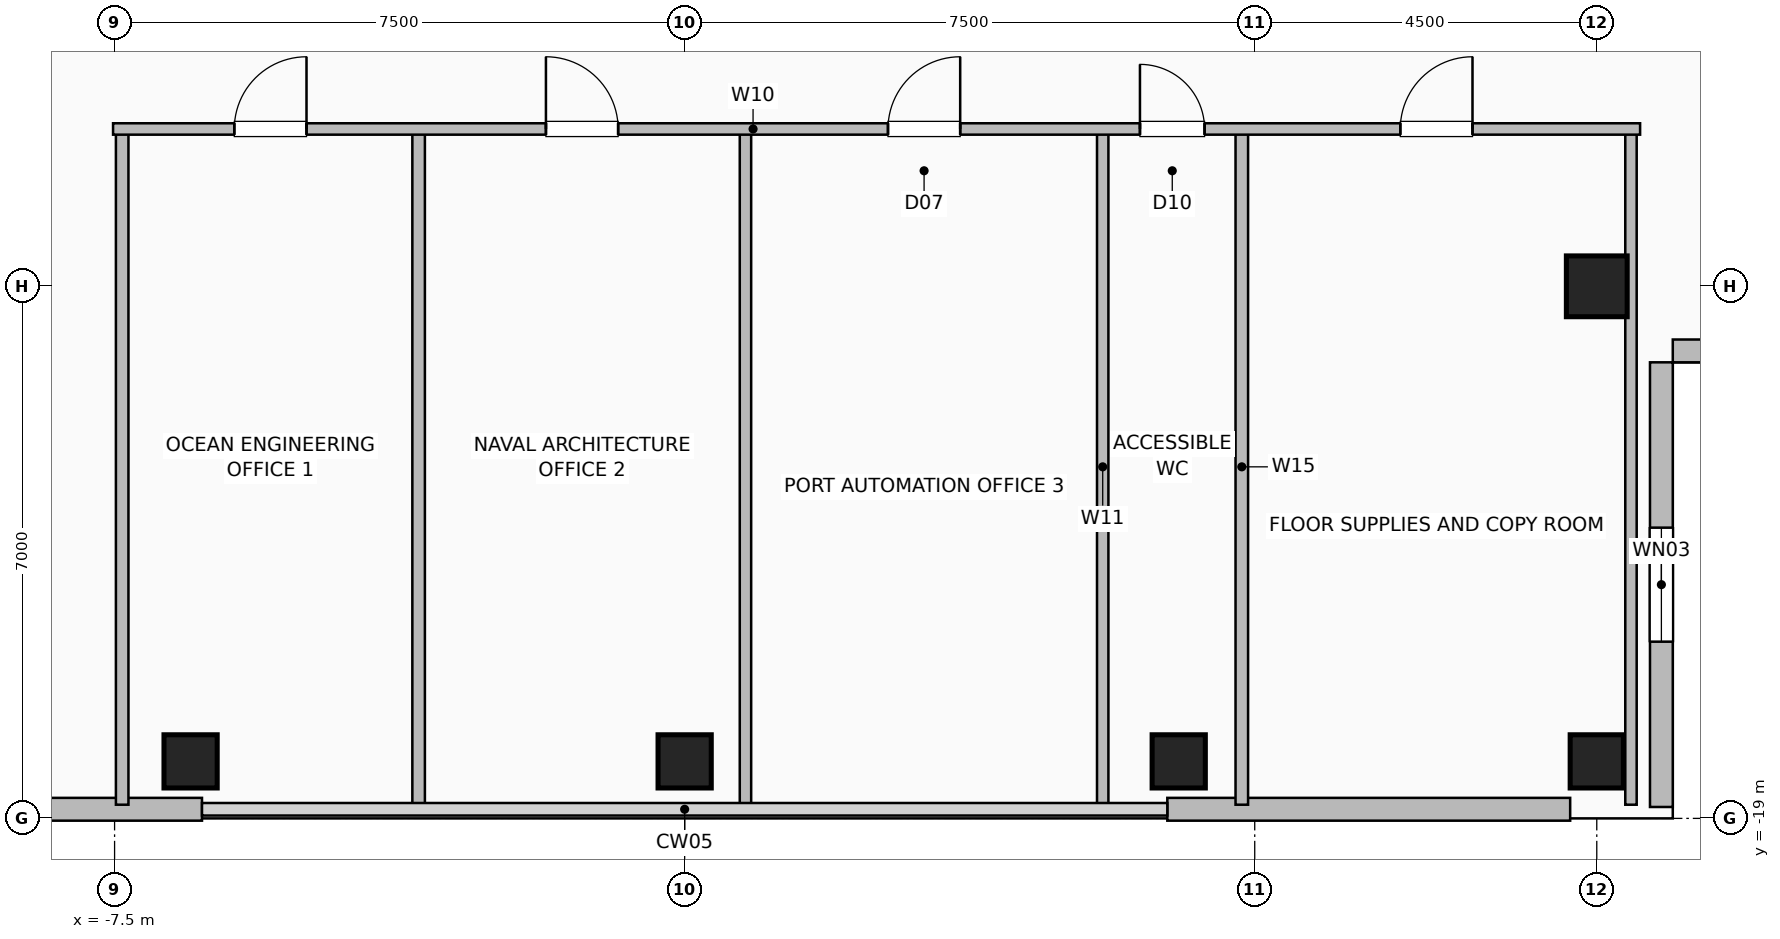
"""IFC4 building model, lengths in metres.
Left out: names, types, materials, properties, quantities, classifications, styles, units other than length and angle.
Written with IfcOpenShell. Run it as: python <this file> out.ifc"""

import sys

from ifc_helpers import new_model, si_unit, direction, frame, frame_2d, origin, origin_2d, place, context, subcontext, project, spatial, rectangle, hollow_rectangle, extrude, element, fill, save


model = new_model("IFC4")
c1 = context("Model", 3, precision=1e-05, world=origin(), true_north=direction((0.0, 1.0)))
c2 = subcontext(c1, "Body", "Model", "MODEL_VIEW")
j1 = project(units=[si_unit("LENGTHUNIT", "METRE"), si_unit("PLANEANGLEUNIT", "RADIAN")], contexts=[c1])
p1 = place(None, origin())
s1 = spatial("IfcSite", under=j1, at=p1, CompositionType="ELEMENT")
p2 = place(p1, origin())
s2 = spatial("IfcBuilding", under=s1, at=p2, CompositionType="ELEMENT")
p3 = place(p2, frame((0.0, 0.0, 290.0)))
s3 = spatial("IfcBuildingStorey", under=s2, at=p3, CompositionType="ELEMENT", Elevation=290.0)
for number, where, z_axis, x_axis in (
    (1, (-6.5, -18.25, 0.0), (0.0, 0.0, 1.0), (1.0, 0.0, 0.0)),
    (2, (0.0, -18.25, 0.0), (0.0, 0.0, 1.0), (1.0, 0.0, 0.0)),
    (3, (6.5, -18.25, 0.0), (0.0, 0.0, 1.0), (1.0, 0.0, 0.0)),
    (4, (12.0, -18.25, 0.0), (0.0, 0.0, 1.0), (1.0, 0.0, 0.0)),
):
    element("IfcColumn", number, at=place(p3, frame(where, z_axis=z_axis, x_axis=x_axis)), inside=s3, PredefinedType="COLUMN", context=c2, shape_type="SweptSolid", body=[
        extrude(hollow_rectangle(XDim=0.7, YDim=0.7, WallThickness=0.035, at=origin_2d()), origin(), (0.0, 0.0, 1.0), 3.6),
    ])
p4 = place(p3, frame((12.0, -12.0, 0.0), z_axis=(0.0, 0.0, 1.0), x_axis=(1.0, 0.0, 0.0)))
e5 = element("IfcColumn", 5, at=p4, inside=s3, PredefinedType="COLUMN", context=c2, shape_type="SweptSolid", body=[
    extrude(hollow_rectangle(XDim=0.8, YDim=0.8, WallThickness=0.04, at=origin_2d()), origin(), (0.0, 0.0, 1.0), 3.6),
])
for number, where, z_axis, x_axis in (
    (6, (-11.65, -18.88, 0.0), (0.0, 0.0, 1.0), (1.0, 0.0, 0.0)),
    (7, (6.35, -18.88, 0.0), (0.0, 0.0, 1.0), (1.0, 0.0, 0.0)),
):
    element("IfcWall", number, at=place(p3, frame(where, z_axis=z_axis, x_axis=x_axis)), inside=s3, PredefinedType="SOLIDWALL", context=c2, shape_type="SweptSolid", body=[
        extrude(rectangle(XDim=5.3, YDim=0.3, at=frame_2d((2.65, 0.0))), origin(), (0.0, 0.0, 1.0), 3.36),
    ])
p5 = place(p3, frame((12.85, -18.85, 0.0), z_axis=(0.0, 0.0, 1.0), x_axis=(0.0, 1.0, 0.0)))
e8 = element("IfcWall", 8, at=p5, inside=s3, PredefinedType="SOLIDWALL", context=c2, shape_type="SweptSolid", body=[
    extrude(rectangle(XDim=5.85, YDim=0.3, at=frame_2d((2.925, 0.0))), origin(), (0.0, 0.0, 1.0), 3.36),
])
p6 = place(p5, frame((2.175, 0.0, 0.9)))
e9 = element("IfcOpeningElement", 9, at=p6, cuts=e8, PredefinedType="OPENING", context=c2, shape_type="SweptSolid", body=[
    extrude(rectangle(XDim=1.5, YDim=1.8, at=frame_2d((0.75, 0.9))), frame((0.0, 0.16, 0.0), z_axis=(0.0, -1.0, 0.0), x_axis=(1.0, 0.0, 0.0)), (0.0, 0.0, 1.0), 0.32),
])
p7 = place(p3, frame((18.85, -12.85, 0.0), z_axis=(0.0, 0.0, 1.0), x_axis=(-1.0, 0.0, 0.0)))
e10 = element("IfcWall", 10, at=p7, inside=s3, PredefinedType="SOLIDWALL", context=c2, shape_type="SweptSolid", body=[
    extrude(rectangle(XDim=5.85, YDim=0.3, at=frame_2d((2.925, 0.0))), origin(), (0.0, 0.0, 1.0), 3.36),
])
for number, where, z_axis, x_axis in (
    (11, (7.33, -18.82, 0.0), (0.0, 0.0, 1.0), (0.0, 1.0, 0.0)),
    (12, (-7.4, -18.82, 0.0), (0.0, 0.0, 1.0), (0.0, 1.0, 0.0)),
    (13, (-3.5, -18.82, 0.0), (0.0, 0.0, 1.0), (0.0, 1.0, 0.0)),
):
    element("IfcWall", number, at=place(p3, frame(where, z_axis=z_axis, x_axis=x_axis)), inside=s3, PredefinedType="PLUMBINGWALL", context=c2, shape_type="SweptSolid", body=[
        extrude(rectangle(XDim=8.89, YDim=0.165, at=frame_2d((4.445, 0.0))), origin(), (0.0, 0.0, 1.0), 3.36),
    ])
for number, where, z_axis, x_axis in (
    (14, (0.8, -18.82, 0.0), (0.0, 0.0, 1.0), (0.0, 1.0, 0.0)),
    (15, (5.5, -18.82, 0.0), (0.0, 0.0, 1.0), (0.0, 1.0, 0.0)),
    (16, (12.45, -18.82, 0.0), (0.0, 0.0, 1.0), (0.0, 1.0, 0.0)),
):
    element("IfcWall", number, at=place(p3, frame(where, z_axis=z_axis, x_axis=x_axis)), inside=s3, PredefinedType="PARTITIONING", context=c2, shape_type="SweptSolid", body=[
        extrude(rectangle(XDim=8.89, YDim=0.15, at=frame_2d((4.445, 0.0))), origin(), (0.0, 0.0, 1.0), 3.36),
    ])
p8 = place(p3, frame((-7.52, -9.93, 0.0), z_axis=(0.0, 0.0, 1.0), x_axis=(1.0, 0.0, 0.0)))
e17 = element("IfcWall", 17, at=p8, inside=s3, PredefinedType="PARTITIONING", context=c2, shape_type="SweptSolid", body=[
    extrude(rectangle(XDim=20.09, YDim=0.15, at=frame_2d((10.045, 0.0))), origin(), (0.0, 0.0, 1.0), 3.36),
])
p9 = place(p8, frame((1.595, 0.0, 0.0)))
e18 = element("IfcOpeningElement", 18, at=p9, cuts=e17, PredefinedType="OPENING", context=c2, shape_type="SweptSolid", body=[
    extrude(rectangle(XDim=0.95, YDim=2.06, at=frame_2d((0.475, 1.03))), frame((0.0, 0.085, 0.0), z_axis=(0.0, -1.0, 0.0), x_axis=(1.0, 0.0, 0.0)), (0.0, 0.0, 1.0), 0.17),
])
p10 = place(p8, frame((5.695, 0.0, 0.0)))
e19 = element("IfcOpeningElement", 19, at=p10, cuts=e17, PredefinedType="OPENING", context=c2, shape_type="SweptSolid", body=[
    extrude(rectangle(XDim=0.95, YDim=2.06, at=frame_2d((0.475, 1.03))), frame((0.0, 0.085, 0.0), z_axis=(0.0, -1.0, 0.0), x_axis=(1.0, 0.0, 0.0)), (0.0, 0.0, 1.0), 0.17),
])
p11 = place(p8, frame((10.195, 0.0, 0.0)))
e20 = element("IfcOpeningElement", 20, at=p11, cuts=e17, PredefinedType="OPENING", context=c2, shape_type="SweptSolid", body=[
    extrude(rectangle(XDim=0.95, YDim=2.06, at=frame_2d((0.475, 1.03))), frame((0.0, 0.085, 0.0), z_axis=(0.0, -1.0, 0.0), x_axis=(1.0, 0.0, 0.0)), (0.0, 0.0, 1.0), 0.17),
])
p12 = place(p8, frame((13.51, 0.0, 0.0)))
e21 = element("IfcOpeningElement", 21, at=p12, cuts=e17, PredefinedType="OPENING", context=c2, shape_type="SweptSolid", body=[
    extrude(rectangle(XDim=0.85, YDim=2.05, at=frame_2d((0.425, 1.025))), frame((0.0, 0.085, 0.0), z_axis=(0.0, -1.0, 0.0), x_axis=(1.0, 0.0, 0.0)), (0.0, 0.0, 1.0), 0.17),
])
p13 = place(p8, frame((16.935, 0.0, 0.0)))
e22 = element("IfcOpeningElement", 22, at=p13, cuts=e17, PredefinedType="OPENING", context=c2, shape_type="SweptSolid", body=[
    extrude(rectangle(XDim=0.95, YDim=2.06, at=frame_2d((0.475, 1.03))), frame((0.0, 0.085, 0.0), z_axis=(0.0, -1.0, 0.0), x_axis=(1.0, 0.0, 0.0)), (0.0, 0.0, 1.0), 0.17),
])
p14 = place(p6, origin())
e23 = element("IfcWindow", 23, at=p14, inside=s3, PartitioningType="SINGLE_PANEL", PredefinedType="WINDOW", context=c2, shape_type="SweptSolid", body=[
    extrude(rectangle(XDim=1.5, YDim=1.8, at=frame_2d((0.75, 0.9))), frame((0.0, 0.03, 0.0), z_axis=(0.0, -1.0, 0.0), x_axis=(1.0, 0.0, 0.0)), (0.0, 0.0, 1.0), 0.06),
])
fill(e9, e23)
p15 = place(p9, origin())
e24 = element("IfcDoor", 24, at=p15, inside=s3, OperationType="SINGLE_SWING_RIGHT", PredefinedType="DOOR", context=c2, shape_type="SweptSolid", body=[
    extrude(rectangle(XDim=0.95, YDim=2.06, at=frame_2d((0.475, 1.03))), frame((0.0, 0.025, 0.0), z_axis=(0.0, -1.0, 0.0), x_axis=(1.0, 0.0, 0.0)), (0.0, 0.0, 1.0), 0.05),
])
fill(e18, e24)
p16 = place(p10, origin())
e25 = element("IfcDoor", 25, at=p16, inside=s3, OperationType="SINGLE_SWING_LEFT", PredefinedType="DOOR", context=c2, shape_type="SweptSolid", body=[
    extrude(rectangle(XDim=0.95, YDim=2.06, at=frame_2d((0.475, 1.03))), frame((0.0, 0.025, 0.0), z_axis=(0.0, -1.0, 0.0), x_axis=(1.0, 0.0, 0.0)), (0.0, 0.0, 1.0), 0.05),
])
fill(e19, e25)
p17 = place(p11, origin())
e26 = element("IfcDoor", 26, at=p17, inside=s3, OperationType="SINGLE_SWING_RIGHT", PredefinedType="DOOR", context=c2, shape_type="SweptSolid", body=[
    extrude(rectangle(XDim=0.95, YDim=2.06, at=frame_2d((0.475, 1.03))), frame((0.0, 0.025, 0.0), z_axis=(0.0, -1.0, 0.0), x_axis=(1.0, 0.0, 0.0)), (0.0, 0.0, 1.0), 0.05),
])
fill(e20, e26)
p18 = place(p12, origin())
e27 = element("IfcDoor", 27, at=p18, inside=s3, OperationType="SINGLE_SWING_LEFT", PredefinedType="DOOR", context=c2, shape_type="SweptSolid", body=[
    extrude(rectangle(XDim=0.85, YDim=2.05, at=frame_2d((0.425, 1.025))), frame((0.0, 0.025, 0.0), z_axis=(0.0, -1.0, 0.0), x_axis=(1.0, 0.0, 0.0)), (0.0, 0.0, 1.0), 0.05),
])
fill(e21, e27)
p19 = place(p13, origin())
e28 = element("IfcDoor", 28, at=p19, inside=s3, OperationType="SINGLE_SWING_RIGHT", PredefinedType="DOOR", context=c2, shape_type="SweptSolid", body=[
    extrude(rectangle(XDim=0.95, YDim=2.06, at=frame_2d((0.475, 1.03))), frame((0.0, 0.025, 0.0), z_axis=(0.0, -1.0, 0.0), x_axis=(1.0, 0.0, 0.0)), (0.0, 0.0, 1.0), 0.05),
])
fill(e22, e28)
save(model, sys.argv[1])
